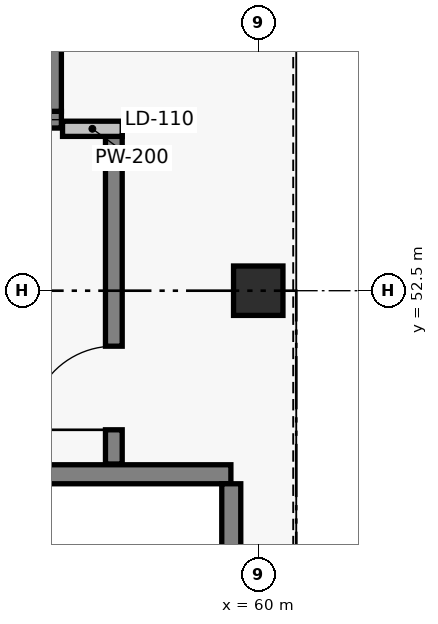
"""IFC4 building model, lengths in metres.
Left out: names, types, materials, properties, quantities, classifications, styles, units other than length and angle.
Written with IfcOpenShell. Run it as: python <this file> out.ifc"""

import sys

from ifc_helpers import new_model, si_unit, direction, frame, frame_2d, origin, origin_2d, place, context, subcontext, project, spatial, rectangle, extrude, element, fill, save


model = new_model("IFC4")
c1 = context("Model", 3, precision=1e-05, world=origin(), true_north=direction((0.0, 1.0)))
c2 = subcontext(c1, "Body", "Model", "MODEL_VIEW")
j1 = project(units=[si_unit("LENGTHUNIT", "METRE"), si_unit("PLANEANGLEUNIT", "RADIAN")], contexts=[c1])
p1 = place(None, origin())
s1 = spatial("IfcSite", under=j1, at=p1, CompositionType="ELEMENT")
p2 = place(p1, origin())
s2 = spatial("IfcBuilding", under=s1, at=p2, CompositionType="ELEMENT")
p3 = place(p2, frame((0.0, 0.0, 21.0)))
s3 = spatial("IfcBuildingStorey", under=s2, at=p3, CompositionType="ELEMENT", Elevation=21.0)
p4 = place(p3, frame((60.0, 52.5, 0.0), z_axis=(0.0, 0.0, 1.0), x_axis=(1.0, 0.0, 0.0)))
e1 = element("IfcColumn", 1, at=p4, inside=s3, PredefinedType="COLUMN", context=c2, shape_type="SweptSolid", body=[
    extrude(rectangle(XDim=0.65, YDim=0.65, at=origin_2d()), origin(), (0.0, 0.0, 1.0), 4.2),
])
p5 = place(p3, frame((52.38, 50.085, 0.0), z_axis=(0.0, 0.0, 1.0), x_axis=(1.0, 0.0, 0.0)))
e2 = element("IfcWall", 2, at=p5, inside=s3, PredefinedType="SOLIDWALL", context=c2, shape_type="SweptSolid", body=[
    extrude(rectangle(XDim=7.26, YDim=0.25, at=frame_2d((3.63, 0.0))), origin(), (0.0, 0.0, 1.0), 3.92),
])
p6 = place(p5, frame((0.62, 0.0, 0.0)))
e3 = element("IfcOpeningElement", 3, at=p6, cuts=e2, PredefinedType="OPENING", context=c2, shape_type="SweptSolid", body=[
    extrude(rectangle(XDim=1.1, YDim=2.15, at=frame_2d((0.55, 1.075))), frame((0.0, 0.135, 0.0), z_axis=(0.0, -1.0, 0.0), x_axis=(1.0, 0.0, 0.0)), (0.0, 0.0, 1.0), 0.27),
])
p7 = place(p3, frame((59.645, 46.4, 0.0), z_axis=(0.0, 0.0, 1.0), x_axis=(0.0, 1.0, 0.0)))
e4 = element("IfcWall", 4, at=p7, inside=s3, PredefinedType="SOLIDWALL", context=c2, shape_type="SweptSolid", body=[
    extrude(rectangle(XDim=3.56, YDim=0.25, at=frame_2d((1.78, 0.0))), origin(), (0.0, 0.0, 1.0), 3.92),
])
p8 = place(p3, frame((54.59, 54.75, 0.0), z_axis=(0.0, 0.0, 1.0), x_axis=(1.0, 0.0, 0.0)))
e5 = element("IfcWall", 5, at=p8, inside=s3, PredefinedType="SOLIDWALL", context=c2, shape_type="SweptSolid", body=[
    extrude(rectangle(XDim=2.82, YDim=0.22, at=frame_2d((1.41, 0.0))), origin(), (0.0, 0.0, 1.0), 3.92),
])
p9 = place(p8, frame((0.86, 0.0, 0.0)))
e6 = element("IfcOpeningElement", 6, at=p9, cuts=e5, PredefinedType="OPENING", context=c2, shape_type="SweptSolid", body=[
    extrude(rectangle(XDim=1.1, YDim=2.15, at=frame_2d((0.55, 1.075))), frame((0.0, 0.12, 0.0), z_axis=(0.0, -1.0, 0.0), x_axis=(1.0, 0.0, 0.0)), (0.0, 0.0, 1.0), 0.24),
])
p10 = place(p3, frame((57.3, 54.86, 0.0), z_axis=(0.0, 0.0, 1.0), x_axis=(0.0, 1.0, 0.0)))
e7 = element("IfcWall", 7, at=p10, inside=s3, PredefinedType="SOLIDWALL", context=c2, shape_type="SweptSolid", body=[
    extrude(rectangle(XDim=2.78, YDim=0.22, at=frame_2d((1.39, 0.0))), origin(), (0.0, 0.0, 1.0), 3.92),
])
p11 = place(p3, frame((58.1, 50.22, 0.0), z_axis=(0.0, 0.0, 1.0), x_axis=(0.0, 1.0, 0.0)))
e8 = element("IfcWall", 8, at=p11, inside=s3, PredefinedType="SOLIDWALL", context=c2, shape_type="SweptSolid", body=[
    extrude(rectangle(XDim=4.41, YDim=0.22, at=frame_2d((2.205, 0.0))), origin(), (0.0, 0.0, 1.0), 3.92),
])
p12 = place(p11, frame((0.45, 0.0, 0.0)))
e9 = element("IfcOpeningElement", 9, at=p12, cuts=e8, PredefinedType="OPENING", context=c2, shape_type="SweptSolid", body=[
    extrude(rectangle(XDim=1.1, YDim=2.15, at=frame_2d((0.55, 1.075))), frame((0.0, 0.12, 0.0), z_axis=(0.0, -1.0, 0.0), x_axis=(1.0, 0.0, 0.0)), (0.0, 0.0, 1.0), 0.24),
])
p13 = place(p3, frame((57.425, 54.63, 0.0), z_axis=(0.0, 0.0, 1.0), x_axis=(1.0, 0.0, 0.0)))
e10 = element("IfcWall", 10, at=p13, inside=s3, PredefinedType="PARTITIONING", context=c2, shape_type="SweptSolid", body=[
    extrude(rectangle(XDim=0.785, YDim=0.2, at=frame_2d((0.393, 0.0))), origin(), (0.0, 0.0, 1.0), 3.9),
])
p14 = place(p12, origin())
e11 = element("IfcDoor", 11, at=p14, inside=s3, OperationType="SINGLE_SWING_LEFT", PredefinedType="DOOR", context=c2, shape_type="SweptSolid", body=[
    extrude(rectangle(XDim=1.1, YDim=2.15, at=frame_2d((0.55, 1.075))), frame((0.0, 0.025, 0.0), z_axis=(0.0, -1.0, 0.0), x_axis=(1.0, 0.0, 0.0)), (0.0, 0.0, 1.0), 0.05),
])
fill(e9, e11)
save(model, sys.argv[1])
